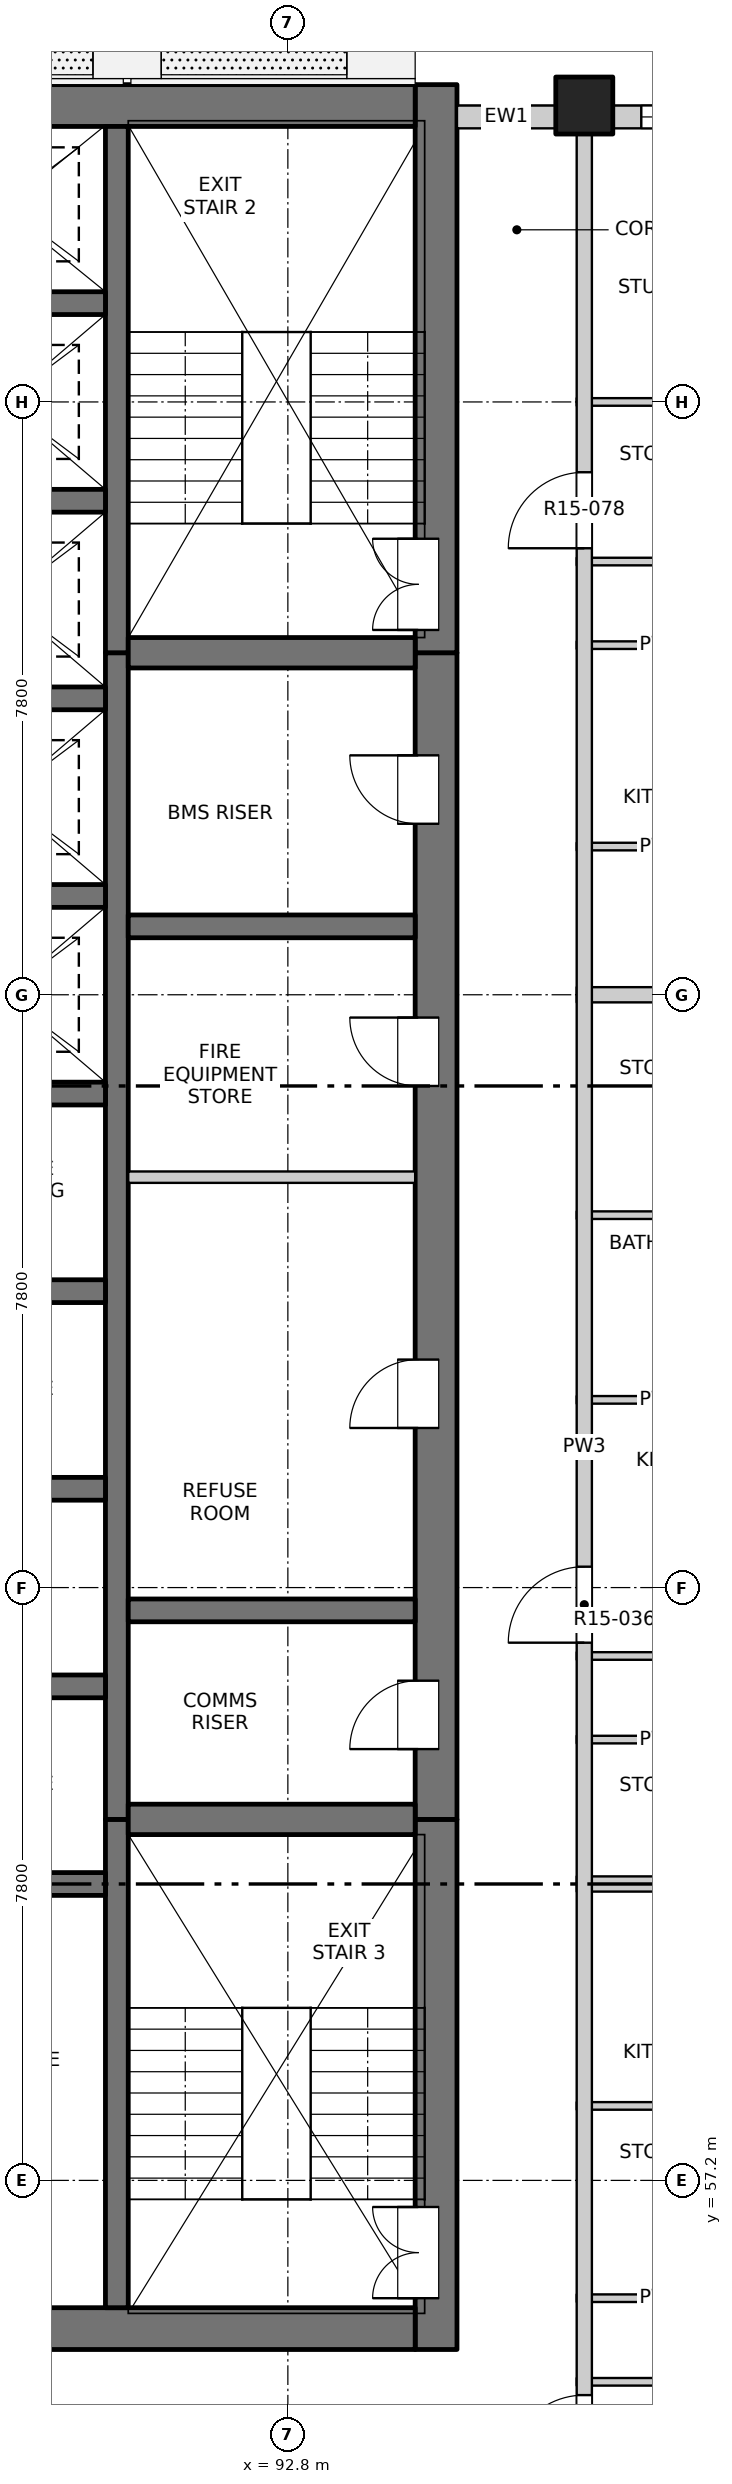
"""IFC4 building model, lengths in metres.
Left out: names, types, materials, properties, quantities, classifications, styles, units other than length and angle.
Written with IfcOpenShell. Run it as: python <this file> out.ifc"""

import sys

from ifc_helpers import new_model, si_unit, direction, frame, frame_2d, origin, origin_2d, place, context, subcontext, project, spatial, rectangle, extrude, element, fill, save


model = new_model("IFC4")
c1 = context("Model", 3, precision=1e-05, world=origin(), true_north=direction((0.0, 1.0)))
c2 = subcontext(c1, "Body", "Model", "MODEL_VIEW")
j1 = project(units=[si_unit("LENGTHUNIT", "METRE"), si_unit("PLANEANGLEUNIT", "RADIAN")], contexts=[c1])
p1 = place(None, origin())
s1 = spatial("IfcSite", under=j1, at=p1, CompositionType="ELEMENT")
p2 = place(p1, origin())
s2 = spatial("IfcBuilding", under=s1, at=p2, CompositionType="ELEMENT")
p3 = place(p2, frame((0.0, 0.0, 158.8)))
s3 = spatial("IfcBuildingStorey", under=s2, at=p3, CompositionType="ELEMENT", Elevation=158.8)
p4 = place(p3, frame((96.7, 84.5, -0.25), z_axis=(0.0, 0.0, 1.0), x_axis=(1.0, 0.0, 0.0)))
e1 = element("IfcColumn", 1, at=p4, inside=s3, PredefinedType="COLUMN", context=c2, shape_type="SweptSolid", body=[
    extrude(rectangle(XDim=0.75, YDim=0.75, at=origin_2d()), origin(), (0.0, 0.0, 1.0), 3.4),
])
p5 = place(p3, frame((94.75, 54.975, -0.25), z_axis=(0.0, 0.0, 1.0), x_axis=(0.0, 1.0, 0.0)))
e2 = element("IfcWall", 2, at=p5, inside=s3, PredefinedType="SOLIDWALL", context=c2, shape_type="SweptSolid", body=[
    extrude(rectangle(XDim=6.975, YDim=0.55, at=frame_2d((3.487, 0.0))), origin(), (0.0, 0.0, 1.0), 3.4),
])
p6 = place(p5, frame((0.675, 0.0, 0.25)))
e3 = element("IfcOpeningElement", 3, at=p6, cuts=e2, PredefinedType="OPENING", context=c2, shape_type="SweptSolid", body=[
    extrude(rectangle(XDim=1.2, YDim=2.1, at=frame_2d((0.6, 1.05))), frame((0.0, 0.285, 0.0), z_axis=(0.0, -1.0, 0.0), x_axis=(1.0, 0.0, 0.0)), (0.0, 0.0, 1.0), 0.57),
])
p7 = place(p3, frame((94.75, 61.95, -0.25), z_axis=(0.0, 0.0, 1.0), x_axis=(0.0, 1.0, 0.0)))
e4 = element("IfcWall", 4, at=p7, inside=s3, PredefinedType="SOLIDWALL", context=c2, shape_type="SweptSolid", body=[
    extrude(rectangle(XDim=15.35, YDim=0.55, at=frame_2d((7.675, 0.0))), origin(), (0.0, 0.0, 1.0), 3.4),
])
p8 = place(p7, frame((0.925, 0.0, 0.25)))
e5 = element("IfcOpeningElement", 5, at=p8, cuts=e4, PredefinedType="OPENING", context=c2, shape_type="SweptSolid", body=[
    extrude(rectangle(XDim=0.9, YDim=2.1, at=frame_2d((0.45, 1.05))), frame((0.0, 0.285, 0.0), z_axis=(0.0, -1.0, 0.0), x_axis=(1.0, 0.0, 0.0)), (0.0, 0.0, 1.0), 0.57),
])
p9 = place(p7, frame((5.15, 0.0, 0.25)))
e6 = element("IfcOpeningElement", 6, at=p9, cuts=e4, PredefinedType="OPENING", context=c2, shape_type="SweptSolid", body=[
    extrude(rectangle(XDim=0.9, YDim=2.1, at=frame_2d((0.45, 1.05))), frame((0.0, 0.285, 0.0), z_axis=(0.0, -1.0, 0.0), x_axis=(1.0, 0.0, 0.0)), (0.0, 0.0, 1.0), 0.57),
])
p10 = place(p7, frame((9.65, 0.0, 0.25)))
e7 = element("IfcOpeningElement", 7, at=p10, cuts=e4, PredefinedType="OPENING", context=c2, shape_type="SweptSolid", body=[
    extrude(rectangle(XDim=0.9, YDim=2.1, at=frame_2d((0.45, 1.05))), frame((0.0, 0.285, 0.0), z_axis=(0.0, -1.0, 0.0), x_axis=(1.0, 0.0, 0.0)), (0.0, 0.0, 1.0), 0.57),
])
p11 = place(p7, frame((13.1, 0.0, 0.25)))
e8 = element("IfcOpeningElement", 8, at=p11, cuts=e4, PredefinedType="OPENING", context=c2, shape_type="SweptSolid", body=[
    extrude(rectangle(XDim=0.9, YDim=2.1, at=frame_2d((0.45, 1.05))), frame((0.0, 0.285, 0.0), z_axis=(0.0, -1.0, 0.0), x_axis=(1.0, 0.0, 0.0)), (0.0, 0.0, 1.0), 0.57),
])
p12 = place(p3, frame((94.75, 77.3, -0.25), z_axis=(0.0, 0.0, 1.0), x_axis=(0.0, 1.0, 0.0)))
e9 = element("IfcWall", 9, at=p12, inside=s3, PredefinedType="SOLIDWALL", context=c2, shape_type="SweptSolid", body=[
    extrude(rectangle(XDim=7.475, YDim=0.55, at=frame_2d((3.737, 0.0))), origin(), (0.0, 0.0, 1.0), 3.4),
])
p13 = place(p12, frame((0.3, 0.0, 0.25)))
e10 = element("IfcOpeningElement", 10, at=p13, cuts=e9, PredefinedType="OPENING", context=c2, shape_type="SweptSolid", body=[
    extrude(rectangle(XDim=1.2, YDim=2.1, at=frame_2d((0.6, 1.05))), frame((0.0, 0.285, 0.0), z_axis=(0.0, -1.0, 0.0), x_axis=(1.0, 0.0, 0.0)), (0.0, 0.0, 1.0), 0.57),
])
p14 = place(p3, frame((75.525, 55.25, -0.25), z_axis=(0.0, 0.0, 1.0), x_axis=(1.0, 0.0, 0.0)))
e11 = element("IfcWall", 11, at=p14, inside=s3, PredefinedType="SOLIDWALL", context=c2, shape_type="SweptSolid", body=[
    extrude(rectangle(XDim=18.95, YDim=0.55, at=frame_2d((9.475, 0.0))), origin(), (0.0, 0.0, 1.0), 3.4),
])
p15 = place(p14, frame((8.725, 0.0, 0.25)))
e12 = element("IfcOpeningElement", 12, at=p15, cuts=e11, PredefinedType="OPENING", context=c2, shape_type="SweptSolid", body=[
    extrude(rectangle(XDim=1.5, YDim=2.1, at=frame_2d((0.75, 1.05))), frame((0.0, 0.285, 0.0), z_axis=(0.0, -1.0, 0.0), x_axis=(1.0, 0.0, 0.0)), (0.0, 0.0, 1.0), 0.57),
])
p16 = place(p3, frame((75.525, 84.5, -0.25), z_axis=(0.0, 0.0, 1.0), x_axis=(1.0, 0.0, 0.0)))
e13 = element("IfcWall", 13, at=p16, inside=s3, PredefinedType="SOLIDWALL", context=c2, shape_type="SweptSolid", body=[
    extrude(rectangle(XDim=18.95, YDim=0.55, at=frame_2d((9.475, 0.0))), origin(), (0.0, 0.0, 1.0), 3.4),
])
p17 = place(p3, frame((90.55, 55.525, -0.25), z_axis=(0.0, 0.0, 1.0), x_axis=(0.0, 1.0, 0.0)))
e14 = element("IfcWall", 14, at=p17, inside=s3, PredefinedType="SOLIDWALL", context=c2, shape_type="SweptSolid", body=[
    extrude(rectangle(XDim=6.425, YDim=0.3, at=frame_2d((3.212, 0.0))), origin(), (0.0, 0.0, 1.0), 3.4),
])
p18 = place(p3, frame((90.55, 61.95, -0.25), z_axis=(0.0, 0.0, 1.0), x_axis=(0.0, 1.0, 0.0)))
e15 = element("IfcWall", 15, at=p18, inside=s3, PredefinedType="SOLIDWALL", context=c2, shape_type="SweptSolid", body=[
    extrude(rectangle(XDim=15.35, YDim=0.3, at=frame_2d((7.675, 0.0))), origin(), (0.0, 0.0, 1.0), 3.4),
])
p19 = place(p3, frame((90.55, 77.3, -0.25), z_axis=(0.0, 0.0, 1.0), x_axis=(0.0, 1.0, 0.0)))
e16 = element("IfcWall", 16, at=p19, inside=s3, PredefinedType="SOLIDWALL", context=c2, shape_type="SweptSolid", body=[
    extrude(rectangle(XDim=6.925, YDim=0.3, at=frame_2d((3.462, 0.0))), origin(), (0.0, 0.0, 1.0), 3.4),
])
for number, where, z_axis, x_axis in (
    (17, (87.4, 61.1, -0.25), (0.0, 0.0, 1.0), (1.0, 0.0, 0.0)),
    (18, (87.4, 63.7, -0.25), (0.0, 0.0, 1.0), (1.0, 0.0, 0.0)),
    (19, (87.4, 66.3, -0.25), (0.0, 0.0, 1.0), (1.0, 0.0, 0.0)),
    (20, (87.4, 68.9, -0.25), (0.0, 0.0, 1.0), (1.0, 0.0, 0.0)),
    (21, (87.4, 71.5, -0.25), (0.0, 0.0, 1.0), (1.0, 0.0, 0.0)),
    (22, (87.4, 74.1, -0.25), (0.0, 0.0, 1.0), (1.0, 0.0, 0.0)),
    (23, (87.4, 76.7, -0.25), (0.0, 0.0, 1.0), (1.0, 0.0, 0.0)),
    (24, (87.4, 79.3, -0.25), (0.0, 0.0, 1.0), (1.0, 0.0, 0.0)),
    (25, (87.4, 81.9, -0.25), (0.0, 0.0, 1.0), (1.0, 0.0, 0.0)),
):
    element("IfcWall", number, at=place(p3, frame(where, z_axis=z_axis, x_axis=x_axis)), inside=s3, PredefinedType="SOLIDWALL", context=c2, shape_type="SweptSolid", body=[
        extrude(rectangle(XDim=3.0, YDim=0.3, at=frame_2d((1.5, 0.0))), origin(), (0.0, 0.0, 1.0), 3.4),
    ])
p20 = place(p3, frame((90.7, 61.95, -0.25), z_axis=(0.0, 0.0, 1.0), x_axis=(1.0, 0.0, 0.0)))
e26 = element("IfcWall", 26, at=p20, inside=s3, PredefinedType="SOLIDWALL", context=c2, shape_type="SweptSolid", body=[
    extrude(rectangle(XDim=3.775, YDim=0.4, at=frame_2d((1.888, 0.0))), origin(), (0.0, 0.0, 1.0), 3.4),
])
for number, where, z_axis, x_axis in (
    (27, (90.7, 64.7, -0.25), (0.0, 0.0, 1.0), (1.0, 0.0, 0.0)),
    (28, (90.7, 73.7, -0.25), (0.0, 0.0, 1.0), (1.0, 0.0, 0.0)),
):
    element("IfcWall", number, at=place(p3, frame(where, z_axis=z_axis, x_axis=x_axis)), inside=s3, PredefinedType="SOLIDWALL", context=c2, shape_type="SweptSolid", body=[
        extrude(rectangle(XDim=3.775, YDim=0.3, at=frame_2d((1.888, 0.0))), origin(), (0.0, 0.0, 1.0), 3.4),
    ])
p21 = place(p3, frame((90.7, 77.3, -0.25), z_axis=(0.0, 0.0, 1.0), x_axis=(1.0, 0.0, 0.0)))
e29 = element("IfcWall", 29, at=p21, inside=s3, PredefinedType="SOLIDWALL", context=c2, shape_type="SweptSolid", body=[
    extrude(rectangle(XDim=3.775, YDim=0.4, at=frame_2d((1.888, 0.0))), origin(), (0.0, 0.0, 1.0), 3.4),
])
p22 = place(p3, frame((95.025, 84.35, 0.0), z_axis=(0.0, 0.0, 1.0), x_axis=(1.0, 0.0, 0.0)))
e30 = element("IfcWall", 30, at=p22, inside=s3, PredefinedType="SOLIDWALL", context=c2, shape_type="SweptSolid", body=[
    extrude(rectangle(XDim=1.3, YDim=0.3, at=frame_2d((0.65, 0.0))), origin(), (0.0, 0.0, 1.0), 2.7),
])
p23 = place(p3, frame((97.075, 84.35, 0.0), z_axis=(0.0, 0.0, 1.0), x_axis=(1.0, 0.0, 0.0)))
e31 = element("IfcWall", 31, at=p23, inside=s3, PredefinedType="SOLIDWALL", context=c2, shape_type="SweptSolid", body=[
    extrude(rectangle(XDim=3.525, YDim=0.3, at=frame_2d((1.763, 0.0))), origin(), (0.0, 0.0, 1.0), 2.7),
])
p24 = place(p23, frame((0.375, 0.0, 0.9)))
e32 = element("IfcOpeningElement", 32, at=p24, cuts=e31, PredefinedType="OPENING", context=c2, shape_type="SweptSolid", body=[
    extrude(rectangle(XDim=2.4, YDim=1.8, at=frame_2d((1.2, 0.9))), frame((0.0, 0.16, 0.0), z_axis=(0.0, -1.0, 0.0), x_axis=(1.0, 0.0, 0.0)), (0.0, 0.0, 1.0), 0.32),
])
for number, where, z_axis, x_axis in (
    (33, (96.6, 54.55, 0.0), (0.0, 0.0, 1.0), (1.0, 0.0, 0.0)),
    (34, (96.6, 55.65, 0.0), (0.0, 0.0, 1.0), (1.0, 0.0, 0.0)),
    (35, (96.6, 58.18, 0.0), (0.0, 0.0, 1.0), (1.0, 0.0, 0.0)),
):
    element("IfcWall", number, at=place(p3, frame(where, z_axis=z_axis, x_axis=x_axis)), inside=s3, PredefinedType="PARTITIONING", context=c2, shape_type="SweptSolid", body=[
        extrude(rectangle(XDim=2.22, YDim=0.1, at=frame_2d((1.11, 0.0))), origin(), (0.0, 0.0, 1.0), 3.15),
    ])
p25 = place(p3, frame((96.6, 61.1, 0.0), z_axis=(0.0, 0.0, 1.0), x_axis=(1.0, 0.0, 0.0)))
e36 = element("IfcWall", 36, at=p25, inside=s3, PredefinedType="PARTITIONING", context=c2, shape_type="SweptSolid", body=[
    extrude(rectangle(XDim=7.6, YDim=0.2, at=frame_2d((3.8, 0.0))), origin(), (0.0, 0.0, 1.0), 2.55),
])
for number, where, z_axis, x_axis in (
    (37, (96.6, 63.0, 0.0), (0.0, 0.0, 1.0), (1.0, 0.0, 0.0)),
    (38, (96.6, 64.1, 0.0), (0.0, 0.0, 1.0), (1.0, 0.0, 0.0)),
    (39, (96.6, 67.47, 0.0), (0.0, 0.0, 1.0), (1.0, 0.0, 0.0)),
    (40, (96.6, 69.9, 0.0), (0.0, 0.0, 1.0), (1.0, 0.0, 0.0)),
):
    element("IfcWall", number, at=place(p3, frame(where, z_axis=z_axis, x_axis=x_axis)), inside=s3, PredefinedType="PARTITIONING", context=c2, shape_type="SweptSolid", body=[
        extrude(rectangle(XDim=2.22, YDim=0.1, at=frame_2d((1.11, 0.0))), origin(), (0.0, 0.0, 1.0), 3.15),
    ])
p26 = place(p3, frame((90.7, 70.4, 0.0), z_axis=(0.0, 0.0, 1.0), x_axis=(1.0, 0.0, 0.0)))
e41 = element("IfcWall", 41, at=p26, inside=s3, PredefinedType="PARTITIONING", context=c2, shape_type="SweptSolid", body=[
    extrude(rectangle(XDim=3.775, YDim=0.15, at=frame_2d((1.887, 0.0))), origin(), (0.0, 0.0, 1.0), 3.15),
])
p27 = place(p3, frame((96.6, 72.8, 0.0), z_axis=(0.0, 0.0, 1.0), x_axis=(1.0, 0.0, 0.0)))
e42 = element("IfcWall", 42, at=p27, inside=s3, PredefinedType="PARTITIONING", context=c2, shape_type="SweptSolid", body=[
    extrude(rectangle(XDim=7.6, YDim=0.2, at=frame_2d((3.8, 0.0))), origin(), (0.0, 0.0, 1.0), 3.15),
])
for number, where, z_axis, x_axis in (
    (43, (96.6, 74.75, 0.0), (0.0, 0.0, 1.0), (1.0, 0.0, 0.0)),
    (44, (96.6, 77.4, 0.0), (0.0, 0.0, 1.0), (1.0, 0.0, 0.0)),
    (45, (96.6, 78.5, 0.0), (0.0, 0.0, 1.0), (1.0, 0.0, 0.0)),
):
    element("IfcWall", number, at=place(p3, frame(where, z_axis=z_axis, x_axis=x_axis)), inside=s3, PredefinedType="PARTITIONING", context=c2, shape_type="SweptSolid", body=[
        extrude(rectangle(XDim=2.22, YDim=0.1, at=frame_2d((1.11, 0.0))), origin(), (0.0, 0.0, 1.0), 3.15),
    ])
p28 = place(p3, frame((96.6, 80.6, 0.0), z_axis=(0.0, 0.0, 1.0), x_axis=(1.0, 0.0, 0.0)))
e46 = element("IfcWall", 46, at=p28, inside=s3, PredefinedType="PARTITIONING", context=c2, shape_type="SweptSolid", body=[
    extrude(rectangle(XDim=7.6, YDim=0.1, at=frame_2d((3.8, 0.0))), origin(), (0.0, 0.0, 1.0), 3.15),
])
p29 = place(p28, frame((2.56, 0.0, 0.0)))
e47 = element("IfcOpeningElement", 47, at=p29, cuts=e46, PredefinedType="OPENING", context=c2, shape_type="SweptSolid", body=[
    extrude(rectangle(XDim=0.9, YDim=2.1, at=frame_2d((0.45, 1.05))), frame((0.0, 0.06, 0.0), z_axis=(0.0, -1.0, 0.0), x_axis=(1.0, 0.0, 0.0)), (0.0, 0.0, 1.0), 0.12),
])
p30 = place(p3, frame((96.7, 49.5, 0.0), z_axis=(0.0, 0.0, 1.0), x_axis=(0.0, 1.0, 0.0)))
e48 = element("IfcWall", 48, at=p30, inside=s3, PredefinedType="PARTITIONING", context=c2, shape_type="SweptSolid", body=[
    extrude(rectangle(XDim=34.7, YDim=0.2, at=frame_2d((17.35, 0.0))), origin(), (0.0, 0.0, 1.0), 3.15),
])
p31 = place(p30, frame((3.875, 0.0, 0.0)))
e49 = element("IfcOpeningElement", 49, at=p31, cuts=e48, PredefinedType="OPENING", context=c2, shape_type="SweptSolid", body=[
    extrude(rectangle(XDim=1.0, YDim=2.1, at=frame_2d((0.5, 1.05))), frame((0.0, 0.11, 0.0), z_axis=(0.0, -1.0, 0.0), x_axis=(1.0, 0.0, 0.0)), (0.0, 0.0, 1.0), 0.22),
])
p32 = place(p30, frame((14.775, 0.0, 0.0)))
e50 = element("IfcOpeningElement", 50, at=p32, cuts=e48, PredefinedType="OPENING", context=c2, shape_type="SweptSolid", body=[
    extrude(rectangle(XDim=1.0, YDim=2.1, at=frame_2d((0.5, 1.05))), frame((0.0, 0.11, 0.0), z_axis=(0.0, -1.0, 0.0), x_axis=(1.0, 0.0, 0.0)), (0.0, 0.0, 1.0), 0.22),
])
p33 = place(p30, frame((29.175, 0.0, 0.0)))
e51 = element("IfcOpeningElement", 51, at=p33, cuts=e48, PredefinedType="OPENING", context=c2, shape_type="SweptSolid", body=[
    extrude(rectangle(XDim=1.0, YDim=2.1, at=frame_2d((0.5, 1.05))), frame((0.0, 0.11, 0.0), z_axis=(0.0, -1.0, 0.0), x_axis=(1.0, 0.0, 0.0)), (0.0, 0.0, 1.0), 0.22),
])
p34 = place(p24, origin())
e52 = element("IfcWindow", 52, at=p34, inside=s3, PartitioningType="DOUBLE_PANEL_VERTICAL", PredefinedType="WINDOW", context=c2, shape_type="SweptSolid", body=[
    extrude(rectangle(XDim=2.4, YDim=1.8, at=frame_2d((1.2, 0.9))), frame((0.0, 0.03, 0.0), z_axis=(0.0, -1.0, 0.0), x_axis=(1.0, 0.0, 0.0)), (0.0, 0.0, 1.0), 0.06),
])
fill(e32, e52)
p35 = place(p31, origin())
e53 = element("IfcDoor", 53, at=p35, inside=s3, OperationType="SINGLE_SWING_RIGHT", PredefinedType="DOOR", context=c2, shape_type="SweptSolid", body=[
    extrude(rectangle(XDim=1.0, YDim=2.1, at=frame_2d((0.5, 1.05))), frame((0.0, 0.025, 0.0), z_axis=(0.0, -1.0, 0.0), x_axis=(1.0, 0.0, 0.0)), (0.0, 0.0, 1.0), 0.05),
])
fill(e49, e53)
p36 = place(p6, origin())
e54 = element("IfcDoor", 54, at=p36, inside=s3, OperationType="DOUBLE_DOOR_SINGLE_SWING", PredefinedType="DOOR", context=c2, shape_type="SweptSolid", body=[
    extrude(rectangle(XDim=1.2, YDim=2.1, at=frame_2d((0.6, 1.05))), frame((0.0, 0.26, 0.0), z_axis=(0.0, -1.0, 0.0), x_axis=(1.0, 0.0, 0.0)), (0.0, 0.0, 1.0), 0.05),
])
fill(e3, e54)
p37 = place(p8, origin())
e55 = element("IfcDoor", 55, at=p37, inside=s3, OperationType="SINGLE_SWING_LEFT", PredefinedType="DOOR", context=c2, shape_type="SweptSolid", body=[
    extrude(rectangle(XDim=0.9, YDim=2.1, at=frame_2d((0.45, 1.05))), frame((0.0, 0.26, 0.0), z_axis=(0.0, -1.0, 0.0), x_axis=(1.0, 0.0, 0.0)), (0.0, 0.0, 1.0), 0.05),
])
fill(e5, e55)
p38 = place(p32, origin())
e56 = element("IfcDoor", 56, at=p38, inside=s3, OperationType="SINGLE_SWING_LEFT", PredefinedType="DOOR", context=c2, shape_type="SweptSolid", body=[
    extrude(rectangle(XDim=1.0, YDim=2.1, at=frame_2d((0.5, 1.05))), frame((0.0, 0.025, 0.0), z_axis=(0.0, -1.0, 0.0), x_axis=(1.0, 0.0, 0.0)), (0.0, 0.0, 1.0), 0.05),
])
fill(e50, e56)
p39 = place(p9, origin())
e57 = element("IfcDoor", 57, at=p39, inside=s3, OperationType="SINGLE_SWING_LEFT", PredefinedType="DOOR", context=c2, shape_type="SweptSolid", body=[
    extrude(rectangle(XDim=0.9, YDim=2.1, at=frame_2d((0.45, 1.05))), frame((0.0, 0.26, 0.0), z_axis=(0.0, -1.0, 0.0), x_axis=(1.0, 0.0, 0.0)), (0.0, 0.0, 1.0), 0.05),
])
fill(e6, e57)
p40 = place(p10, origin())
e58 = element("IfcDoor", 58, at=p40, inside=s3, OperationType="SINGLE_SWING_RIGHT", PredefinedType="DOOR", context=c2, shape_type="SweptSolid", body=[
    extrude(rectangle(XDim=0.9, YDim=2.1, at=frame_2d((0.45, 1.05))), frame((0.0, 0.26, 0.0), z_axis=(0.0, -1.0, 0.0), x_axis=(1.0, 0.0, 0.0)), (0.0, 0.0, 1.0), 0.05),
])
fill(e7, e58)
p41 = place(p11, origin())
e59 = element("IfcDoor", 59, at=p41, inside=s3, OperationType="SINGLE_SWING_RIGHT", PredefinedType="DOOR", context=c2, shape_type="SweptSolid", body=[
    extrude(rectangle(XDim=0.9, YDim=2.1, at=frame_2d((0.45, 1.05))), frame((0.0, 0.26, 0.0), z_axis=(0.0, -1.0, 0.0), x_axis=(1.0, 0.0, 0.0)), (0.0, 0.0, 1.0), 0.05),
])
fill(e8, e59)
p42 = place(p13, origin())
e60 = element("IfcDoor", 60, at=p42, inside=s3, OperationType="DOUBLE_DOOR_SINGLE_SWING", PredefinedType="DOOR", context=c2, shape_type="SweptSolid", body=[
    extrude(rectangle(XDim=1.2, YDim=2.1, at=frame_2d((0.6, 1.05))), frame((0.0, 0.26, 0.0), z_axis=(0.0, -1.0, 0.0), x_axis=(1.0, 0.0, 0.0)), (0.0, 0.0, 1.0), 0.05),
])
fill(e10, e60)
p43 = place(p33, origin())
e61 = element("IfcDoor", 61, at=p43, inside=s3, OperationType="SINGLE_SWING_LEFT", PredefinedType="DOOR", context=c2, shape_type="SweptSolid", body=[
    extrude(rectangle(XDim=1.0, YDim=2.1, at=frame_2d((0.5, 1.05))), frame((0.0, 0.025, 0.0), z_axis=(0.0, -1.0, 0.0), x_axis=(1.0, 0.0, 0.0)), (0.0, 0.0, 1.0), 0.05),
])
fill(e51, e61)
save(model, sys.argv[1])
